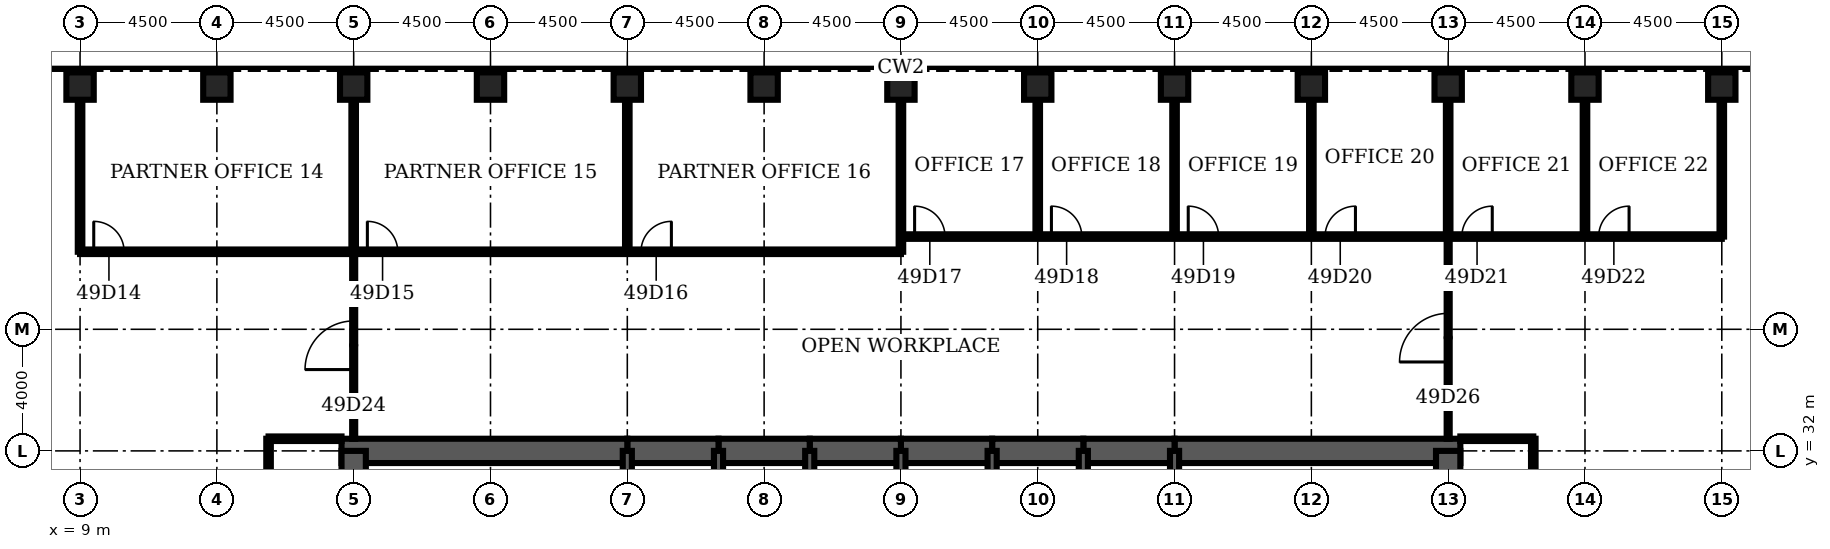
"""IFC4 building model, lengths in metres.
Left out: names, types, materials, properties, quantities, classifications, styles, units other than length and angle.
Written with IfcOpenShell. Run it as: python <this file> out.ifc"""

import sys

from ifc_helpers import new_model, si_unit, direction, frame, frame_2d, origin, origin_2d, place, context, subcontext, project, spatial, rectangle, hollow_rectangle, extrude, element, fill, save


model = new_model("IFC4")
c1 = context("Model", 3, precision=1e-05, world=origin(), true_north=direction((0.0, 1.0)))
c2 = subcontext(c1, "Body", "Model", "MODEL_VIEW")
j1 = project(units=[si_unit("LENGTHUNIT", "METRE"), si_unit("PLANEANGLEUNIT", "RADIAN")], contexts=[c1])
p1 = place(None, origin())
s1 = spatial("IfcSite", under=j1, at=p1, CompositionType="ELEMENT")
p2 = place(p1, origin())
s2 = spatial("IfcBuilding", under=s1, at=p2, CompositionType="ELEMENT")
p3 = place(p2, frame((0.0, 0.0, 219.4)))
s3 = spatial("IfcBuildingStorey", under=s2, at=p3, CompositionType="ELEMENT", Elevation=219.4)
for number, where, z_axis, x_axis in (
    (1, (63.0, 44.0, 0.0), (0.0, 0.0, 1.0), (0.0, 1.0, 0.0)),
    (2, (58.5, 44.0, 0.0), (0.0, 0.0, 1.0), (0.0, 1.0, 0.0)),
    (3, (54.0, 44.0, 0.0), (0.0, 0.0, 1.0), (0.0, 1.0, 0.0)),
    (4, (49.5, 44.0, 0.0), (0.0, 0.0, 1.0), (0.0, 1.0, 0.0)),
    (5, (45.0, 44.0, 0.0), (0.0, 0.0, 1.0), (0.0, 1.0, 0.0)),
    (6, (40.5, 44.0, 0.0), (0.0, 0.0, 1.0), (0.0, 1.0, 0.0)),
    (7, (36.0, 44.0, 0.0), (0.0, 0.0, 1.0), (0.0, 1.0, 0.0)),
    (8, (31.5, 44.0, 0.0), (0.0, 0.0, 1.0), (0.0, 1.0, 0.0)),
    (9, (27.0, 44.0, 0.0), (0.0, 0.0, 1.0), (0.0, 1.0, 0.0)),
    (10, (22.5, 44.0, 0.0), (0.0, 0.0, 1.0), (0.0, 1.0, 0.0)),
    (11, (18.0, 44.0, 0.0), (0.0, 0.0, 1.0), (0.0, 1.0, 0.0)),
    (12, (13.5, 44.0, 0.0), (0.0, 0.0, 1.0), (0.0, 1.0, 0.0)),
    (13, (9.0, 44.0, 0.0), (0.0, 0.0, 1.0), (0.0, 1.0, 0.0)),
):
    element("IfcColumn", number, at=place(p3, frame(where, z_axis=z_axis, x_axis=x_axis)), inside=s3, PredefinedType="COLUMN", context=c2, shape_type="SweptSolid", body=[
        extrude(hollow_rectangle(XDim=0.9, YDim=0.9, WallThickness=0.08, at=origin_2d()), origin(), (0.0, 0.0, 1.0), 4.2),
    ])
p4 = place(p3, frame((54.4, 32.0, 0.0), z_axis=(0.0, 0.0, 1.0), x_axis=(-1.0, 0.0, 0.0)))
e14 = element("IfcWall", 14, at=p4, inside=s3, PredefinedType="SHEAR", context=c2, shape_type="SweptSolid", body=[
    extrude(rectangle(XDim=9.4, YDim=0.8, at=frame_2d((4.7, 0.0))), origin(), (0.0, 0.0, 1.0), 4.2),
])
for number, where, z_axis, x_axis in (
    (15, (45.0, 32.0, 0.0), (0.0, 0.0, 1.0), (-1.0, 0.0, 0.0)),
    (16, (42.0, 32.0, 0.0), (0.0, 0.0, 1.0), (-1.0, 0.0, 0.0)),
    (17, (39.0, 32.0, 0.0), (0.0, 0.0, 1.0), (-1.0, 0.0, 0.0)),
    (18, (36.0, 32.0, 0.0), (0.0, 0.0, 1.0), (-1.0, 0.0, 0.0)),
    (19, (33.0, 32.0, 0.0), (0.0, 0.0, 1.0), (-1.0, 0.0, 0.0)),
    (20, (30.0, 32.0, 0.0), (0.0, 0.0, 1.0), (-1.0, 0.0, 0.0)),
):
    element("IfcWall", number, at=place(p3, frame(where, z_axis=z_axis, x_axis=x_axis)), inside=s3, PredefinedType="SHEAR", context=c2, shape_type="SweptSolid", body=[
        extrude(rectangle(XDim=3.0, YDim=0.8, at=frame_2d((1.5, 0.0))), origin(), (0.0, 0.0, 1.0), 4.2),
    ])
p5 = place(p3, frame((27.0, 32.0, 0.0), z_axis=(0.0, 0.0, 1.0), x_axis=(-1.0, 0.0, 0.0)))
e21 = element("IfcWall", 21, at=p5, inside=s3, PredefinedType="SHEAR", context=c2, shape_type="SweptSolid", body=[
    extrude(rectangle(XDim=9.4, YDim=0.8, at=frame_2d((4.7, 0.0))), origin(), (0.0, 0.0, 1.0), 4.2),
])
for number, where, z_axis, x_axis in (
    (22, (18.0, 32.0, 0.0), (0.0, 0.0, 1.0), (0.0, -1.0, 0.0)),
    (23, (54.0, 28.8, 0.0), (0.0, 0.0, 1.0), (0.0, 1.0, 0.0)),
):
    element("IfcWall", number, at=place(p3, frame(where, z_axis=z_axis, x_axis=x_axis)), inside=s3, PredefinedType="SHEAR", context=c2, shape_type="SweptSolid", body=[
        extrude(rectangle(XDim=3.2, YDim=0.8, at=frame_2d((1.6, 0.0))), origin(), (0.0, 0.0, 1.0), 4.2),
    ])
for number, where, z_axis, x_axis in (
    (24, (27.0, 28.8, 0.0), (0.0, 0.0, 1.0), (0.0, 1.0, 0.0)),
    (25, (30.0, 28.8, 0.0), (0.0, 0.0, 1.0), (0.0, 1.0, 0.0)),
    (26, (33.0, 28.8, 0.0), (0.0, 0.0, 1.0), (0.0, 1.0, 0.0)),
    (27, (36.0, 28.8, 0.0), (0.0, 0.0, 1.0), (0.0, 1.0, 0.0)),
    (28, (39.0, 28.8, 0.0), (0.0, 0.0, 1.0), (0.0, 1.0, 0.0)),
    (29, (42.0, 28.8, 0.0), (0.0, 0.0, 1.0), (0.0, 1.0, 0.0)),
    (30, (45.0, 28.8, 0.0), (0.0, 0.0, 1.0), (0.0, 1.0, 0.0)),
):
    element("IfcWall", number, at=place(p3, frame(where, z_axis=z_axis, x_axis=x_axis)), inside=s3, PredefinedType="SOLIDWALL", context=c2, shape_type="SweptSolid", body=[
        extrude(rectangle(XDim=3.2, YDim=0.3, at=frame_2d((1.6, 0.0))), origin(), (0.0, 0.0, 1.0), 4.2),
    ])
for number, where, z_axis, x_axis in (
    (31, (15.2, 32.4, 0.0), (0.0, 0.0, 1.0), (1.0, 0.0, 0.0)),
    (32, (54.4, 32.4, 0.0), (0.0, 0.0, 1.0), (1.0, 0.0, 0.0)),
):
    element("IfcWall", number, at=place(p3, frame(where, z_axis=z_axis, x_axis=x_axis)), inside=s3, PredefinedType="PARTITIONING", context=c2, shape_type="SweptSolid", body=[
        extrude(rectangle(XDim=2.4, YDim=0.15, at=frame_2d((1.2, 0.0))), origin(), (0.0, 0.0, 1.0), 3.0),
    ])
p6 = place(p3, frame((9.0, 38.55, 0.0), z_axis=(0.0, 0.0, 1.0), x_axis=(1.0, 0.0, 0.0)))
e33 = element("IfcWall", 33, at=p6, inside=s3, PredefinedType="PARTITIONING", context=c2, shape_type="SweptSolid", body=[
    extrude(rectangle(XDim=27.0, YDim=0.15, at=frame_2d((13.5, 0.0))), origin(), (0.0, 0.0, 1.0), 3.0),
])
p7 = place(p6, frame((0.45, 0.0, 0.0)))
e34 = element("IfcOpeningElement", 34, at=p7, cuts=e33, PredefinedType="OPENING", context=c2, shape_type="SweptSolid", body=[
    extrude(rectangle(XDim=1.0, YDim=2.1, at=frame_2d((0.5, 1.05))), frame((0.0, 0.085, 0.0), z_axis=(0.0, -1.0, 0.0), x_axis=(1.0, 0.0, 0.0)), (0.0, 0.0, 1.0), 0.17),
])
p8 = place(p6, frame((9.45, 0.0, 0.0)))
e35 = element("IfcOpeningElement", 35, at=p8, cuts=e33, PredefinedType="OPENING", context=c2, shape_type="SweptSolid", body=[
    extrude(rectangle(XDim=1.0, YDim=2.1, at=frame_2d((0.5, 1.05))), frame((0.0, 0.085, 0.0), z_axis=(0.0, -1.0, 0.0), x_axis=(1.0, 0.0, 0.0)), (0.0, 0.0, 1.0), 0.17),
])
p9 = place(p6, frame((18.45, 0.0, 0.0)))
e36 = element("IfcOpeningElement", 36, at=p9, cuts=e33, PredefinedType="OPENING", context=c2, shape_type="SweptSolid", body=[
    extrude(rectangle(XDim=1.0, YDim=2.1, at=frame_2d((0.5, 1.05))), frame((0.0, 0.085, 0.0), z_axis=(0.0, -1.0, 0.0), x_axis=(1.0, 0.0, 0.0)), (0.0, 0.0, 1.0), 0.17),
])
p10 = place(p3, frame((36.0, 39.05, 0.0), z_axis=(0.0, 0.0, 1.0), x_axis=(1.0, 0.0, 0.0)))
e37 = element("IfcWall", 37, at=p10, inside=s3, PredefinedType="PARTITIONING", context=c2, shape_type="SweptSolid", body=[
    extrude(rectangle(XDim=27.0, YDim=0.15, at=frame_2d((13.5, 0.0))), origin(), (0.0, 0.0, 1.0), 3.0),
])
p11 = place(p10, frame((0.45, 0.0, 0.0)))
e38 = element("IfcOpeningElement", 38, at=p11, cuts=e37, PredefinedType="OPENING", context=c2, shape_type="SweptSolid", body=[
    extrude(rectangle(XDim=1.0, YDim=2.1, at=frame_2d((0.5, 1.05))), frame((0.0, 0.085, 0.0), z_axis=(0.0, -1.0, 0.0), x_axis=(1.0, 0.0, 0.0)), (0.0, 0.0, 1.0), 0.17),
])
p12 = place(p10, frame((4.95, 0.0, 0.0)))
e39 = element("IfcOpeningElement", 39, at=p12, cuts=e37, PredefinedType="OPENING", context=c2, shape_type="SweptSolid", body=[
    extrude(rectangle(XDim=1.0, YDim=2.1, at=frame_2d((0.5, 1.05))), frame((0.0, 0.085, 0.0), z_axis=(0.0, -1.0, 0.0), x_axis=(1.0, 0.0, 0.0)), (0.0, 0.0, 1.0), 0.17),
])
p13 = place(p10, frame((9.45, 0.0, 0.0)))
e40 = element("IfcOpeningElement", 40, at=p13, cuts=e37, PredefinedType="OPENING", context=c2, shape_type="SweptSolid", body=[
    extrude(rectangle(XDim=1.0, YDim=2.1, at=frame_2d((0.5, 1.05))), frame((0.0, 0.085, 0.0), z_axis=(0.0, -1.0, 0.0), x_axis=(1.0, 0.0, 0.0)), (0.0, 0.0, 1.0), 0.17),
])
p14 = place(p10, frame((13.95, 0.0, 0.0)))
e41 = element("IfcOpeningElement", 41, at=p14, cuts=e37, PredefinedType="OPENING", context=c2, shape_type="SweptSolid", body=[
    extrude(rectangle(XDim=1.0, YDim=2.1, at=frame_2d((0.5, 1.05))), frame((0.0, 0.085, 0.0), z_axis=(0.0, -1.0, 0.0), x_axis=(1.0, 0.0, 0.0)), (0.0, 0.0, 1.0), 0.17),
])
p15 = place(p10, frame((18.45, 0.0, 0.0)))
e42 = element("IfcOpeningElement", 42, at=p15, cuts=e37, PredefinedType="OPENING", context=c2, shape_type="SweptSolid", body=[
    extrude(rectangle(XDim=1.0, YDim=2.1, at=frame_2d((0.5, 1.05))), frame((0.0, 0.085, 0.0), z_axis=(0.0, -1.0, 0.0), x_axis=(1.0, 0.0, 0.0)), (0.0, 0.0, 1.0), 0.17),
])
p16 = place(p10, frame((22.95, 0.0, 0.0)))
e43 = element("IfcOpeningElement", 43, at=p16, cuts=e37, PredefinedType="OPENING", context=c2, shape_type="SweptSolid", body=[
    extrude(rectangle(XDim=1.0, YDim=2.1, at=frame_2d((0.5, 1.05))), frame((0.0, 0.085, 0.0), z_axis=(0.0, -1.0, 0.0), x_axis=(1.0, 0.0, 0.0)), (0.0, 0.0, 1.0), 0.17),
])
p17 = place(p3, frame((9.0, 38.55, 0.0), z_axis=(0.0, 0.0, 1.0), x_axis=(0.0, 1.0, 0.0)))
e44 = element("IfcWall", 44, at=p17, inside=s3, PredefinedType="PARTITIONING", context=c2, shape_type="SweptSolid", body=[
    extrude(rectangle(XDim=5.0, YDim=0.15, at=frame_2d((2.5, 0.0))), origin(), (0.0, 0.0, 1.0), 3.0),
])
p18 = place(p3, frame((15.2, 13.8, 0.0), z_axis=(0.0, 0.0, 1.0), x_axis=(0.0, 1.0, 0.0)))
e45 = element("IfcWall", 45, at=p18, inside=s3, PredefinedType="PARTITIONING", context=c2, shape_type="SweptSolid", body=[
    extrude(rectangle(XDim=18.6, YDim=0.15, at=frame_2d((9.3, 0.0))), origin(), (0.0, 0.0, 1.0), 3.0),
])
p19 = place(p18, frame((8.7, 0.0, 0.0)))
e46 = element("IfcOpeningElement", 46, at=p19, cuts=e45, PredefinedType="OPENING", context=c2, shape_type="SweptSolid", body=[
    extrude(rectangle(XDim=1.2, YDim=2.1, at=frame_2d((0.6, 1.05))), frame((0.0, 0.085, 0.0), z_axis=(0.0, -1.0, 0.0), x_axis=(1.0, 0.0, 0.0)), (0.0, 0.0, 1.0), 0.17),
])
p20 = place(p3, frame((18.0, 32.4, 0.0), z_axis=(0.0, 0.0, 1.0), x_axis=(0.0, 1.0, 0.0)))
e47 = element("IfcWall", 47, at=p20, inside=s3, PredefinedType="PARTITIONING", context=c2, shape_type="SweptSolid", body=[
    extrude(rectangle(XDim=6.15, YDim=0.1, at=frame_2d((3.075, 0.0))), origin(), (0.0, 0.0, 1.0), 3.0),
])
p21 = place(p20, frame((2.275, 0.0, 0.0)))
e48 = element("IfcOpeningElement", 48, at=p21, cuts=e47, PredefinedType="OPENING", context=c2, shape_type="SweptSolid", body=[
    extrude(rectangle(XDim=1.6, YDim=2.1, at=frame_2d((0.8, 1.05))), frame((0.0, 0.06, 0.0), z_axis=(0.0, -1.0, 0.0), x_axis=(1.0, 0.0, 0.0)), (0.0, 0.0, 1.0), 0.12),
])
for number, where, z_axis, x_axis in (
    (49, (18.0, 38.55, 0.0), (0.0, 0.0, 1.0), (0.0, 1.0, 0.0)),
    (50, (27.0, 38.55, 0.0), (0.0, 0.0, 1.0), (0.0, 1.0, 0.0)),
    (51, (36.0, 38.55, 0.0), (0.0, 0.0, 1.0), (0.0, 1.0, 0.0)),
):
    element("IfcWall", number, at=place(p3, frame(where, z_axis=z_axis, x_axis=x_axis)), inside=s3, PredefinedType="PARTITIONING", context=c2, shape_type="SweptSolid", body=[
        extrude(rectangle(XDim=5.0, YDim=0.15, at=frame_2d((2.5, 0.0))), origin(), (0.0, 0.0, 1.0), 3.0),
    ])
for number, where, z_axis, x_axis in (
    (52, (40.5, 39.05, 0.0), (0.0, 0.0, 1.0), (0.0, 1.0, 0.0)),
    (53, (45.0, 39.05, 0.0), (0.0, 0.0, 1.0), (0.0, 1.0, 0.0)),
    (54, (49.5, 39.05, 0.0), (0.0, 0.0, 1.0), (0.0, 1.0, 0.0)),
):
    element("IfcWall", number, at=place(p3, frame(where, z_axis=z_axis, x_axis=x_axis)), inside=s3, PredefinedType="PARTITIONING", context=c2, shape_type="SweptSolid", body=[
        extrude(rectangle(XDim=4.5, YDim=0.15, at=frame_2d((2.25, 0.0))), origin(), (0.0, 0.0, 1.0), 3.0),
    ])
p22 = place(p3, frame((54.0, 32.4, 0.0), z_axis=(0.0, 0.0, 1.0), x_axis=(0.0, 1.0, 0.0)))
e55 = element("IfcWall", 55, at=p22, inside=s3, PredefinedType="PARTITIONING", context=c2, shape_type="SweptSolid", body=[
    extrude(rectangle(XDim=6.65, YDim=0.1, at=frame_2d((3.325, 0.0))), origin(), (0.0, 0.0, 1.0), 3.0),
])
p23 = place(p22, frame((2.525, 0.0, 0.0)))
e56 = element("IfcOpeningElement", 56, at=p23, cuts=e55, PredefinedType="OPENING", context=c2, shape_type="SweptSolid", body=[
    extrude(rectangle(XDim=1.6, YDim=2.1, at=frame_2d((0.8, 1.05))), frame((0.0, 0.06, 0.0), z_axis=(0.0, -1.0, 0.0), x_axis=(1.0, 0.0, 0.0)), (0.0, 0.0, 1.0), 0.12),
])
p24 = place(p3, frame((54.0, 39.05, 0.0), z_axis=(0.0, 0.0, 1.0), x_axis=(0.0, 1.0, 0.0)))
e57 = element("IfcWall", 57, at=p24, inside=s3, PredefinedType="PARTITIONING", context=c2, shape_type="SweptSolid", body=[
    extrude(rectangle(XDim=4.5, YDim=0.15, at=frame_2d((2.25, 0.0))), origin(), (0.0, 0.0, 1.0), 3.0),
])
p25 = place(p3, frame((56.8, 13.8, 0.0), z_axis=(0.0, 0.0, 1.0), x_axis=(0.0, 1.0, 0.0)))
e58 = element("IfcWall", 58, at=p25, inside=s3, PredefinedType="PARTITIONING", context=c2, shape_type="SweptSolid", body=[
    extrude(rectangle(XDim=18.6, YDim=0.15, at=frame_2d((9.3, 0.0))), origin(), (0.0, 0.0, 1.0), 3.0),
])
p26 = place(p25, frame((8.7, 0.0, 0.0)))
e59 = element("IfcOpeningElement", 59, at=p26, cuts=e58, PredefinedType="OPENING", context=c2, shape_type="SweptSolid", body=[
    extrude(rectangle(XDim=1.2, YDim=2.1, at=frame_2d((0.6, 1.05))), frame((0.0, 0.085, 0.0), z_axis=(0.0, -1.0, 0.0), x_axis=(1.0, 0.0, 0.0)), (0.0, 0.0, 1.0), 0.17),
])
for number, where, z_axis, x_axis in (
    (60, (58.5, 39.05, 0.0), (0.0, 0.0, 1.0), (0.0, 1.0, 0.0)),
    (61, (63.0, 39.05, 0.0), (0.0, 0.0, 1.0), (0.0, 1.0, 0.0)),
):
    element("IfcWall", number, at=place(p3, frame(where, z_axis=z_axis, x_axis=x_axis)), inside=s3, PredefinedType="PARTITIONING", context=c2, shape_type="SweptSolid", body=[
        extrude(rectangle(XDim=4.5, YDim=0.15, at=frame_2d((2.25, 0.0))), origin(), (0.0, 0.0, 1.0), 3.0),
    ])
p27 = place(p7, origin())
e62 = element("IfcDoor", 62, at=p27, inside=s3, OperationType="SINGLE_SWING_LEFT", PredefinedType="DOOR", context=c2, shape_type="SweptSolid", body=[
    extrude(rectangle(XDim=1.0, YDim=2.1, at=frame_2d((0.5, 1.05))), frame((0.0, 0.025, 0.0), z_axis=(0.0, -1.0, 0.0), x_axis=(1.0, 0.0, 0.0)), (0.0, 0.0, 1.0), 0.05),
])
fill(e34, e62)
p28 = place(p8, origin())
e63 = element("IfcDoor", 63, at=p28, inside=s3, OperationType="SINGLE_SWING_LEFT", PredefinedType="DOOR", context=c2, shape_type="SweptSolid", body=[
    extrude(rectangle(XDim=1.0, YDim=2.1, at=frame_2d((0.5, 1.05))), frame((0.0, 0.025, 0.0), z_axis=(0.0, -1.0, 0.0), x_axis=(1.0, 0.0, 0.0)), (0.0, 0.0, 1.0), 0.05),
])
fill(e35, e63)
p29 = place(p9, origin())
e64 = element("IfcDoor", 64, at=p29, inside=s3, OperationType="SINGLE_SWING_RIGHT", PredefinedType="DOOR", context=c2, shape_type="SweptSolid", body=[
    extrude(rectangle(XDim=1.0, YDim=2.1, at=frame_2d((0.5, 1.05))), frame((0.0, 0.025, 0.0), z_axis=(0.0, -1.0, 0.0), x_axis=(1.0, 0.0, 0.0)), (0.0, 0.0, 1.0), 0.05),
])
fill(e36, e64)
p30 = place(p11, origin())
e65 = element("IfcDoor", 65, at=p30, inside=s3, OperationType="SINGLE_SWING_LEFT", PredefinedType="DOOR", context=c2, shape_type="SweptSolid", body=[
    extrude(rectangle(XDim=1.0, YDim=2.1, at=frame_2d((0.5, 1.05))), frame((0.0, 0.025, 0.0), z_axis=(0.0, -1.0, 0.0), x_axis=(1.0, 0.0, 0.0)), (0.0, 0.0, 1.0), 0.05),
])
fill(e38, e65)
p31 = place(p12, origin())
e66 = element("IfcDoor", 66, at=p31, inside=s3, OperationType="SINGLE_SWING_LEFT", PredefinedType="DOOR", context=c2, shape_type="SweptSolid", body=[
    extrude(rectangle(XDim=1.0, YDim=2.1, at=frame_2d((0.5, 1.05))), frame((0.0, 0.025, 0.0), z_axis=(0.0, -1.0, 0.0), x_axis=(1.0, 0.0, 0.0)), (0.0, 0.0, 1.0), 0.05),
])
fill(e39, e66)
p32 = place(p13, origin())
e67 = element("IfcDoor", 67, at=p32, inside=s3, OperationType="SINGLE_SWING_LEFT", PredefinedType="DOOR", context=c2, shape_type="SweptSolid", body=[
    extrude(rectangle(XDim=1.0, YDim=2.1, at=frame_2d((0.5, 1.05))), frame((0.0, 0.025, 0.0), z_axis=(0.0, -1.0, 0.0), x_axis=(1.0, 0.0, 0.0)), (0.0, 0.0, 1.0), 0.05),
])
fill(e40, e67)
p33 = place(p14, origin())
e68 = element("IfcDoor", 68, at=p33, inside=s3, OperationType="SINGLE_SWING_RIGHT", PredefinedType="DOOR", context=c2, shape_type="SweptSolid", body=[
    extrude(rectangle(XDim=1.0, YDim=2.1, at=frame_2d((0.5, 1.05))), frame((0.0, 0.025, 0.0), z_axis=(0.0, -1.0, 0.0), x_axis=(1.0, 0.0, 0.0)), (0.0, 0.0, 1.0), 0.05),
])
fill(e41, e68)
p34 = place(p15, origin())
e69 = element("IfcDoor", 69, at=p34, inside=s3, OperationType="SINGLE_SWING_RIGHT", PredefinedType="DOOR", context=c2, shape_type="SweptSolid", body=[
    extrude(rectangle(XDim=1.0, YDim=2.1, at=frame_2d((0.5, 1.05))), frame((0.0, 0.025, 0.0), z_axis=(0.0, -1.0, 0.0), x_axis=(1.0, 0.0, 0.0)), (0.0, 0.0, 1.0), 0.05),
])
fill(e42, e69)
p35 = place(p16, origin())
e70 = element("IfcDoor", 70, at=p35, inside=s3, OperationType="SINGLE_SWING_RIGHT", PredefinedType="DOOR", context=c2, shape_type="SweptSolid", body=[
    extrude(rectangle(XDim=1.0, YDim=2.1, at=frame_2d((0.5, 1.05))), frame((0.0, 0.025, 0.0), z_axis=(0.0, -1.0, 0.0), x_axis=(1.0, 0.0, 0.0)), (0.0, 0.0, 1.0), 0.05),
])
fill(e43, e70)
p36 = place(p21, origin())
e71 = element("IfcDoor", 71, at=p36, inside=s3, OperationType="SINGLE_SWING_LEFT", PredefinedType="DOOR", context=c2, shape_type="SweptSolid", body=[
    extrude(rectangle(XDim=1.6, YDim=2.1, at=frame_2d((0.8, 1.05))), frame((0.0, 0.025, 0.0), z_axis=(0.0, -1.0, 0.0), x_axis=(1.0, 0.0, 0.0)), (0.0, 0.0, 1.0), 0.05),
])
fill(e48, e71)
p37 = place(p23, origin())
e72 = element("IfcDoor", 72, at=p37, inside=s3, OperationType="SINGLE_SWING_LEFT", PredefinedType="DOOR", context=c2, shape_type="SweptSolid", body=[
    extrude(rectangle(XDim=1.6, YDim=2.1, at=frame_2d((0.8, 1.05))), frame((0.0, 0.025, 0.0), z_axis=(0.0, -1.0, 0.0), x_axis=(1.0, 0.0, 0.0)), (0.0, 0.0, 1.0), 0.05),
])
fill(e56, e72)
save(model, sys.argv[1])
